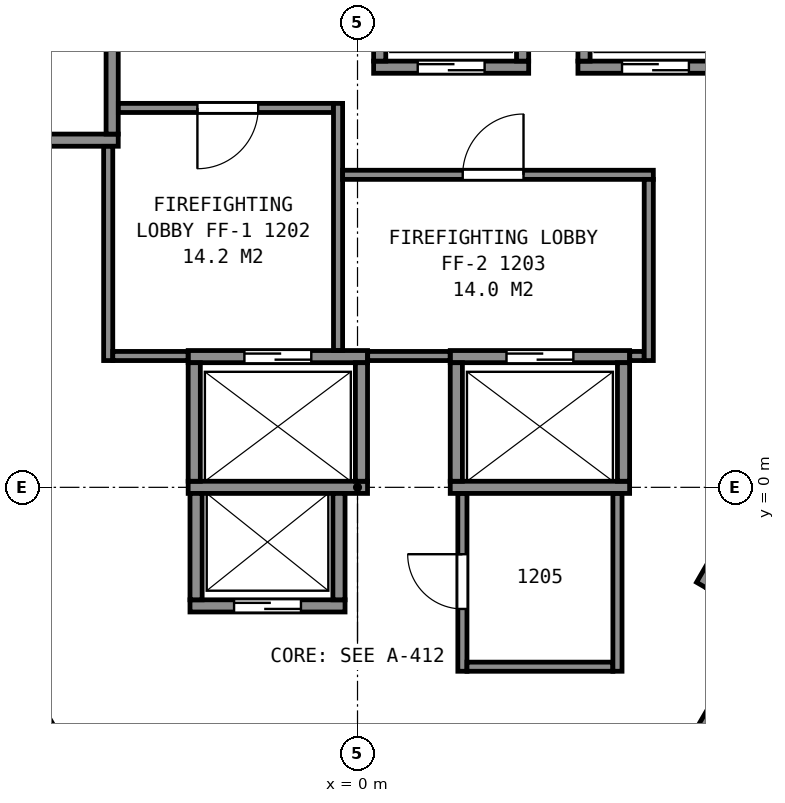
"""IFC4 building model, lengths in metres.
Left out: names, types, materials, properties, quantities, classifications, styles, units other than length and angle.
Written with IfcOpenShell. Run it as: python <this file> out.ifc"""

import sys

from ifc_helpers import new_model, si_unit, direction, frame, frame_2d, origin, place, context, subcontext, project, spatial, rectangle, extrude, element, fill, save


model = new_model("IFC4")
c1 = context("Model", 3, precision=1e-05, world=origin(), true_north=direction((0.0, 1.0)))
c2 = subcontext(c1, "Body", "Model", "MODEL_VIEW")
j1 = project(units=[si_unit("LENGTHUNIT", "METRE"), si_unit("PLANEANGLEUNIT", "RADIAN")], contexts=[c1])
p1 = place(None, origin())
s1 = spatial("IfcSite", under=j1, at=p1, CompositionType="ELEMENT")
p2 = place(p1, origin())
s2 = spatial("IfcBuilding", under=s1, at=p2, CompositionType="ELEMENT")
p3 = place(p2, frame((0.0, 0.0, 58.4)))
s3 = spatial("IfcBuildingStorey", under=s2, at=p3, CompositionType="ELEMENT", Elevation=58.4)
p4 = place(p3, frame((-2.755, -1.95, 0.0), z_axis=(0.0, 0.0, 1.0), x_axis=(1.0, 0.0, 0.0)))
e1 = element("IfcWall", 1, at=p4, inside=s3, PredefinedType="PARTITIONING", context=c2, shape_type="SweptSolid", body=[
    extrude(rectangle(XDim=2.55, YDim=0.2, at=frame_2d((1.275, 0.0))), origin(), (0.0, 0.0, 1.0), 3.6),
])
p5 = place(p4, frame((0.725, 0.0, 0.0)))
e2 = element("IfcOpeningElement", 2, at=p5, cuts=e1, PredefinedType="OPENING", context=c2, shape_type="SweptSolid", body=[
    extrude(rectangle(XDim=1.1, YDim=2.1, at=frame_2d((0.55, 1.05))), frame((0.0, 0.11, 0.0), z_axis=(0.0, -1.0, 0.0), x_axis=(1.0, 0.0, 0.0)), (0.0, 0.0, 1.0), 0.22),
])
p6 = place(p3, frame((-2.785, 0.0, 0.0), z_axis=(0.0, 0.0, 1.0), x_axis=(1.0, 0.0, 0.0)))
e3 = element("IfcWall", 3, at=p6, inside=s3, PredefinedType="PARTITIONING", context=c2, shape_type="SweptSolid", body=[
    extrude(rectangle(XDim=2.95, YDim=0.2, at=frame_2d((1.475, 0.0))), origin(), (0.0, 0.0, 1.0), 3.6),
])
p7 = place(p3, frame((1.525, 0.0, 0.0), z_axis=(0.0, 0.0, 1.0), x_axis=(1.0, 0.0, 0.0)))
e4 = element("IfcWall", 4, at=p7, inside=s3, PredefinedType="PARTITIONING", context=c2, shape_type="SweptSolid", body=[
    extrude(rectangle(XDim=2.95, YDim=0.2, at=frame_2d((1.475, 0.0))), origin(), (0.0, 0.0, 1.0), 3.6),
])
p8 = place(p3, frame((-2.785, 2.15, 0.0), z_axis=(0.0, 0.0, 1.0), x_axis=(1.0, 0.0, 0.0)))
e5 = element("IfcWall", 5, at=p8, inside=s3, PredefinedType="PARTITIONING", context=c2, shape_type="SweptSolid", body=[
    extrude(rectangle(XDim=2.95, YDim=0.2, at=frame_2d((1.475, 0.0))), origin(), (0.0, 0.0, 1.0), 3.6),
])
p9 = place(p8, frame((0.925, 0.0, 0.0)))
e6 = element("IfcOpeningElement", 6, at=p9, cuts=e5, PredefinedType="OPENING", context=c2, shape_type="SweptSolid", body=[
    extrude(rectangle(XDim=1.1, YDim=2.1, at=frame_2d((0.55, 1.05))), frame((0.0, 0.11, 0.0), z_axis=(0.0, -1.0, 0.0), x_axis=(1.0, 0.0, 0.0)), (0.0, 0.0, 1.0), 0.22),
])
p10 = place(p3, frame((1.525, 2.15, 0.0), z_axis=(0.0, 0.0, 1.0), x_axis=(1.0, 0.0, 0.0)))
e7 = element("IfcWall", 7, at=p10, inside=s3, PredefinedType="PARTITIONING", context=c2, shape_type="SweptSolid", body=[
    extrude(rectangle(XDim=2.95, YDim=0.2, at=frame_2d((1.475, 0.0))), origin(), (0.0, 0.0, 1.0), 3.6),
])
p11 = place(p10, frame((0.925, 0.0, 0.0)))
e8 = element("IfcOpeningElement", 8, at=p11, cuts=e7, PredefinedType="OPENING", context=c2, shape_type="SweptSolid", body=[
    extrude(rectangle(XDim=1.1, YDim=2.1, at=frame_2d((0.55, 1.05))), frame((0.0, 0.11, 0.0), z_axis=(0.0, -1.0, 0.0), x_axis=(1.0, 0.0, 0.0)), (0.0, 0.0, 1.0), 0.22),
])
p12 = place(p3, frame((-6.285, 5.71, 0.0), z_axis=(0.0, 0.0, 1.0), x_axis=(1.0, 0.0, 0.0)))
e9 = element("IfcWall", 9, at=p12, inside=s3, PredefinedType="PARTITIONING", context=c2, shape_type="SweptSolid", body=[
    extrude(rectangle(XDim=2.35, YDim=0.2, at=frame_2d((1.175, 0.0))), origin(), (0.0, 0.0, 1.0), 3.6),
])
p13 = place(p3, frame((0.265, 6.91, 0.0), z_axis=(0.0, 0.0, 1.0), x_axis=(1.0, 0.0, 0.0)))
e10 = element("IfcWall", 10, at=p13, inside=s3, PredefinedType="PARTITIONING", context=c2, shape_type="SweptSolid", body=[
    extrude(rectangle(XDim=2.55, YDim=0.2, at=frame_2d((1.275, 0.0))), origin(), (0.0, 0.0, 1.0), 3.6),
])
p14 = place(p13, frame((0.725, 0.0, 0.0)))
e11 = element("IfcOpeningElement", 11, at=p14, cuts=e10, PredefinedType="OPENING", context=c2, shape_type="SweptSolid", body=[
    extrude(rectangle(XDim=1.1, YDim=2.1, at=frame_2d((0.55, 1.05))), frame((0.0, 0.11, 0.0), z_axis=(0.0, -1.0, 0.0), x_axis=(1.0, 0.0, 0.0)), (0.0, 0.0, 1.0), 0.22),
])
p15 = place(p3, frame((3.625, 6.91, 0.0), z_axis=(0.0, 0.0, 1.0), x_axis=(1.0, 0.0, 0.0)))
e12 = element("IfcWall", 12, at=p15, inside=s3, PredefinedType="PARTITIONING", context=c2, shape_type="SweptSolid", body=[
    extrude(rectangle(XDim=2.55, YDim=0.2, at=frame_2d((1.275, 0.0))), origin(), (0.0, 0.0, 1.0), 3.6),
])
p16 = place(p15, frame((0.725, 0.0, 0.0)))
e13 = element("IfcOpeningElement", 13, at=p16, cuts=e12, PredefinedType="OPENING", context=c2, shape_type="SweptSolid", body=[
    extrude(rectangle(XDim=1.1, YDim=2.1, at=frame_2d((0.55, 1.05))), frame((0.0, 0.11, 0.0), z_axis=(0.0, -1.0, 0.0), x_axis=(1.0, 0.0, 0.0)), (0.0, 0.0, 1.0), 0.22),
])
p17 = place(p3, frame((5.527, -4.247, 0.0), z_axis=(0.0, 0.0, 1.0), x_axis=(0.499938297808, 0.866061024631, 0.0)))
e14 = element("IfcWall", 14, at=p17, inside=s3, PredefinedType="PARTITIONING", context=c2, shape_type="SweptSolid", body=[
    extrude(rectangle(XDim=2.35, YDim=0.2, at=frame_2d((1.175, 0.0))), origin(), (0.0, 0.0, 1.0), 3.6),
])
p18 = place(p17, frame((0.725, 0.0, 0.0)))
e15 = element("IfcOpeningElement", 15, at=p18, cuts=e14, PredefinedType="OPENING", context=c2, shape_type="SweptSolid", body=[
    extrude(rectangle(XDim=1.1, YDim=2.1, at=frame_2d((0.55, 1.05))), frame((0.0, 0.11, 0.0), z_axis=(0.0, -1.0, 0.0), x_axis=(1.0, 0.0, 0.0)), (0.0, 0.0, 1.0), 0.22),
])
p19 = place(p3, frame((5.663, -1.612, 0.0), z_axis=(0.0, 0.0, 1.0), x_axis=(0.49998122708, 0.866036242063, 0.0)))
e16 = element("IfcWall", 16, at=p19, inside=s3, PredefinedType="PARTITIONING", context=c2, shape_type="SweptSolid", body=[
    extrude(rectangle(XDim=4.9, YDim=0.2, at=frame_2d((2.45, 0.0))), origin(), (0.0, 0.0, 1.0), 3.6),
])
p20 = place(p3, frame((4.375, 0.1, 0.0), z_axis=(0.0, 0.0, 1.0), x_axis=(0.0, 1.0, 0.0)))
e17 = element("IfcWall", 17, at=p20, inside=s3, PredefinedType="PARTITIONING", context=c2, shape_type="SweptSolid", body=[
    extrude(rectangle(XDim=1.95, YDim=0.2, at=frame_2d((0.975, 0.0))), origin(), (0.0, 0.0, 1.0), 3.6),
])
for number, where, z_axis, x_axis in (
    (18, (3.725, 7.01, 0.0), (0.0, 0.0, 1.0), (0.0, 1.0, 0.0)),
    (19, (2.715, 7.01, 0.0), (0.0, 0.0, 1.0), (0.0, 1.0, 0.0)),
):
    element("IfcWall", number, at=place(p3, frame(where, z_axis=z_axis, x_axis=x_axis)), inside=s3, PredefinedType="PARTITIONING", context=c2, shape_type="SweptSolid", body=[
        extrude(rectangle(XDim=1.75, YDim=0.2, at=frame_2d((0.875, 0.0))), origin(), (0.0, 0.0, 1.0), 3.6),
    ])
p21 = place(p3, frame((1.625, 0.1, 0.0), z_axis=(0.0, 0.0, 1.0), x_axis=(0.0, 1.0, 0.0)))
e20 = element("IfcWall", 20, at=p21, inside=s3, PredefinedType="PARTITIONING", context=c2, shape_type="SweptSolid", body=[
    extrude(rectangle(XDim=1.95, YDim=0.2, at=frame_2d((0.975, 0.0))), origin(), (0.0, 0.0, 1.0), 3.6),
])
p22 = place(p3, frame((0.365, 7.01, 0.0), z_axis=(0.0, 0.0, 1.0), x_axis=(0.0, 1.0, 0.0)))
e21 = element("IfcWall", 21, at=p22, inside=s3, PredefinedType="PARTITIONING", context=c2, shape_type="SweptSolid", body=[
    extrude(rectangle(XDim=1.75, YDim=0.2, at=frame_2d((0.875, 0.0))), origin(), (0.0, 0.0, 1.0), 3.6),
])
p23 = place(p3, frame((0.065, 0.1, 0.0), z_axis=(0.0, 0.0, 1.0), x_axis=(0.0, 1.0, 0.0)))
e22 = element("IfcWall", 22, at=p23, inside=s3, PredefinedType="PARTITIONING", context=c2, shape_type="SweptSolid", body=[
    extrude(rectangle(XDim=1.95, YDim=0.2, at=frame_2d((0.975, 0.0))), origin(), (0.0, 0.0, 1.0), 3.6),
])
for number, where, z_axis, x_axis in (
    (23, (-0.305, -1.85, 0.0), (0.0, 0.0, 1.0), (0.0, 1.0, 0.0)),
    (24, (-2.655, -1.85, 0.0), (0.0, 0.0, 1.0), (0.0, 1.0, 0.0)),
):
    element("IfcWall", number, at=place(p3, frame(where, z_axis=z_axis, x_axis=x_axis)), inside=s3, PredefinedType="PARTITIONING", context=c2, shape_type="SweptSolid", body=[
        extrude(rectangle(XDim=1.75, YDim=0.2, at=frame_2d((0.875, 0.0))), origin(), (0.0, 0.0, 1.0), 3.6),
    ])
p24 = place(p3, frame((-2.685, 0.1, 0.0), z_axis=(0.0, 0.0, 1.0), x_axis=(0.0, 1.0, 0.0)))
e25 = element("IfcWall", 25, at=p24, inside=s3, PredefinedType="PARTITIONING", context=c2, shape_type="SweptSolid", body=[
    extrude(rectangle(XDim=1.95, YDim=0.2, at=frame_2d((0.975, 0.0))), origin(), (0.0, 0.0, 1.0), 3.6),
])
p25 = place(p3, frame((-4.035, 5.81, 0.0), z_axis=(0.0, 0.0, 1.0), x_axis=(0.0, 1.0, 0.0)))
e26 = element("IfcWall", 26, at=p25, inside=s3, PredefinedType="PARTITIONING", context=c2, shape_type="SweptSolid", body=[
    extrude(rectangle(XDim=1.75, YDim=0.2, at=frame_2d((0.875, 0.0))), origin(), (0.0, 0.0, 1.0), 3.6),
])
p26 = place(p3, frame((-13.664, 5.946, 0.0), z_axis=(0.0, 0.0, 1.0), x_axis=(0.499994327219, -0.866028678941, 0.0)))
e27 = element("IfcWall", 27, at=p26, inside=s3, PredefinedType="PARTITIONING", context=c2, shape_type="SweptSolid", body=[
    extrude(rectangle(XDim=23.968, YDim=0.2, at=frame_2d((11.984, 0.0))), origin(), (0.0, 0.0, 1.0), 3.35),
])
p27 = place(p3, frame((-4.091, -5.635, 0.0), z_axis=(0.0, 0.0, 1.0), x_axis=(-0.499948934428, 0.866054884499, 0.0)))
e28 = element("IfcWall", 28, at=p27, inside=s3, PredefinedType="PARTITIONING", context=c2, shape_type="SweptSolid", body=[
    extrude(rectangle(XDim=3.577, YDim=0.15, at=frame_2d((1.789, 0.0))), origin(), (0.0, 0.0, 1.0), 3.35),
])
p28 = place(p27, frame((2.377, 0.0, 0.0)))
e29 = element("IfcOpeningElement", 29, at=p28, cuts=e28, PredefinedType="OPENING", context=c2, shape_type="SweptSolid", body=[
    extrude(rectangle(XDim=0.9, YDim=2.1, at=frame_2d((0.45, 1.05))), frame((0.0, 0.085, 0.0), z_axis=(0.0, -1.0, 0.0), x_axis=(1.0, 0.0, 0.0)), (0.0, 0.0, 1.0), 0.17),
])
p29 = place(p27, frame((0.605, 0.0, 0.0)))
e30 = element("IfcOpeningElement", 30, at=p29, cuts=e28, PredefinedType="OPENING", context=c2, shape_type="SweptSolid", body=[
    extrude(rectangle(XDim=0.9, YDim=2.1, at=frame_2d((0.45, 1.05))), frame((0.0, 0.085, 0.0), z_axis=(0.0, -1.0, 0.0), x_axis=(1.0, 0.0, 0.0)), (0.0, 0.0, 1.0), 0.17),
])
p30 = place(p3, frame((-4.1, 2.085, 0.0), z_axis=(0.0, 0.0, 1.0), x_axis=(0.0, 1.0, 0.0)))
e31 = element("IfcWall", 31, at=p30, inside=s3, PredefinedType="PARTITIONING", context=c2, shape_type="SweptSolid", body=[
    extrude(rectangle(XDim=3.523, YDim=0.15, at=frame_2d((1.761, 0.0))), origin(), (0.0, 0.0, 1.0), 3.35),
])
p31 = place(p3, frame((-4.025, 2.16, 0.0), z_axis=(0.0, 0.0, 1.0), x_axis=(1.0, 0.0, 0.0)))
e32 = element("IfcWall", 32, at=p31, inside=s3, PredefinedType="PARTITIONING", context=c2, shape_type="SweptSolid", body=[
    extrude(rectangle(XDim=1.238, YDim=0.15, at=frame_2d((0.619, 0.0))), origin(), (0.0, 0.0, 1.0), 3.35),
])
p32 = place(p3, frame((-3.933, 6.24, 0.0), z_axis=(0.0, 0.0, 1.0), x_axis=(1.0, 0.0, 0.0)))
e33 = element("IfcWall", 33, at=p32, inside=s3, PredefinedType="PARTITIONING", context=c2, shape_type="SweptSolid", body=[
    extrude(rectangle(XDim=3.538, YDim=0.15, at=frame_2d((1.769, 0.0))), origin(), (0.0, 0.0, 1.0), 3.35),
])
p33 = place(p32, frame((1.3, 0.0, 0.0)))
e34 = element("IfcOpeningElement", 34, at=p33, cuts=e33, PredefinedType="OPENING", context=c2, shape_type="SweptSolid", body=[
    extrude(rectangle(XDim=1.0, YDim=2.1, at=frame_2d((0.5, 1.05))), frame((0.0, 0.085, 0.0), z_axis=(0.0, -1.0, 0.0), x_axis=(1.0, 0.0, 0.0)), (0.0, 0.0, 1.0), 0.17),
])
p34 = place(p3, frame((-0.32, 2.252, 0.0), z_axis=(0.0, 0.0, 1.0), x_axis=(0.0, 1.0, 0.0)))
e35 = element("IfcWall", 35, at=p34, inside=s3, PredefinedType="PARTITIONING", context=c2, shape_type="SweptSolid", body=[
    extrude(rectangle(XDim=4.063, YDim=0.15, at=frame_2d((2.031, 0.0))), origin(), (0.0, 0.0, 1.0), 3.35),
])
p35 = place(p3, frame((-0.245, 5.14, 0.0), z_axis=(0.0, 0.0, 1.0), x_axis=(1.0, 0.0, 0.0)))
e36 = element("IfcWall", 36, at=p35, inside=s3, PredefinedType="PARTITIONING", context=c2, shape_type="SweptSolid", body=[
    extrude(rectangle(XDim=5.11, YDim=0.15, at=frame_2d((2.555, 0.0))), origin(), (0.0, 0.0, 1.0), 3.35),
])
p36 = place(p35, frame((1.975, 0.0, 0.0)))
e37 = element("IfcOpeningElement", 37, at=p36, cuts=e36, PredefinedType="OPENING", context=c2, shape_type="SweptSolid", body=[
    extrude(rectangle(XDim=1.0, YDim=2.1, at=frame_2d((0.5, 1.05))), frame((0.0, 0.085, 0.0), z_axis=(0.0, -1.0, 0.0), x_axis=(1.0, 0.0, 0.0)), (0.0, 0.0, 1.0), 0.17),
])
p37 = place(p3, frame((0.167, 2.16, 0.0), z_axis=(0.0, 0.0, 1.0), x_axis=(1.0, 0.0, 0.0)))
e38 = element("IfcWall", 38, at=p37, inside=s3, PredefinedType="PARTITIONING", context=c2, shape_type="SweptSolid", body=[
    extrude(rectangle(XDim=1.356, YDim=0.15, at=frame_2d((0.678, 0.0))), origin(), (0.0, 0.0, 1.0), 3.35),
])
p38 = place(p3, frame((1.725, -0.102, 0.0), z_axis=(0.0, 0.0, 1.0), x_axis=(0.0, -1.0, 0.0)))
e39 = element("IfcWall", 39, at=p38, inside=s3, PredefinedType="PARTITIONING", context=c2, shape_type="SweptSolid", body=[
    extrude(rectangle(XDim=2.923, YDim=0.15, at=frame_2d((1.461, 0.0))), origin(), (0.0, 0.0, 1.0), 3.35),
])
p39 = place(p38, frame((0.998, 0.0, 0.0)))
e40 = element("IfcOpeningElement", 40, at=p39, cuts=e39, PredefinedType="OPENING", context=c2, shape_type="SweptSolid", body=[
    extrude(rectangle(XDim=0.9, YDim=2.1, at=frame_2d((0.45, 1.05))), frame((0.0, 0.085, 0.0), z_axis=(0.0, -1.0, 0.0), x_axis=(1.0, 0.0, 0.0)), (0.0, 0.0, 1.0), 0.17),
])
p40 = place(p3, frame((1.8, -2.95, 0.0), z_axis=(0.0, 0.0, 1.0), x_axis=(1.0, 0.0, 0.0)))
e41 = element("IfcWall", 41, at=p40, inside=s3, PredefinedType="PARTITIONING", context=c2, shape_type="SweptSolid", body=[
    extrude(rectangle(XDim=2.4, YDim=0.15, at=frame_2d((1.2, 0.0))), origin(), (0.0, 0.0, 1.0), 3.35),
])
p41 = place(p3, frame((4.275, -3.025, 0.0), z_axis=(0.0, 0.0, 1.0), x_axis=(0.0, 1.0, 0.0)))
e42 = element("IfcWall", 42, at=p41, inside=s3, PredefinedType="PARTITIONING", context=c2, shape_type="SweptSolid", body=[
    extrude(rectangle(XDim=2.923, YDim=0.15, at=frame_2d((1.461, 0.0))), origin(), (0.0, 0.0, 1.0), 3.35),
])
p42 = place(p3, frame((4.477, 2.16, 0.0), z_axis=(0.0, 0.0, 1.0), x_axis=(1.0, 0.0, 0.0)))
e43 = element("IfcWall", 43, at=p42, inside=s3, PredefinedType="PARTITIONING", context=c2, shape_type="SweptSolid", body=[
    extrude(rectangle(XDim=0.238, YDim=0.15, at=frame_2d((0.119, 0.0))), origin(), (0.0, 0.0, 1.0), 3.35),
])
p43 = place(p3, frame((4.79, 2.085, 0.0), z_axis=(0.0, 0.0, 1.0), x_axis=(0.0, 1.0, 0.0)))
e44 = element("IfcWall", 44, at=p43, inside=s3, PredefinedType="PARTITIONING", context=c2, shape_type="SweptSolid", body=[
    extrude(rectangle(XDim=2.98, YDim=0.15, at=frame_2d((1.49, 0.0))), origin(), (0.0, 0.0, 1.0), 3.35),
])
p44 = place(p3, frame((-3.766, -17.558, 0.0), z_axis=(0.0, 0.0, 1.0), x_axis=(-0.500008349927, 0.866020582898, 0.0)))
e45 = element("IfcWall", 45, at=p44, inside=s3, PredefinedType="PARTITIONING", context=c2, shape_type="SweptSolid", body=[
    extrude(rectangle(XDim=22.496, YDim=0.125, at=frame_2d((11.248, 0.0))), origin(), (0.0, 0.0, 1.0), 2.613),
])
p45 = place(p44, frame((20.563, 0.0, 0.0)))
e46 = element("IfcOpeningElement", 46, at=p45, cuts=e45, PredefinedType="OPENING", context=c2, shape_type="SweptSolid", body=[
    extrude(rectangle(XDim=0.9, YDim=2.1, at=frame_2d((0.45, 1.05))), frame((0.0, 0.073, 0.0), z_axis=(0.0, -1.0, 0.0), x_axis=(1.0, 0.0, 0.0)), (0.0, 0.0, 1.0), 0.145),
])
p46 = place(p44, frame((13.476, 0.0, 0.0)))
e47 = element("IfcOpeningElement", 47, at=p46, cuts=e45, PredefinedType="OPENING", context=c2, shape_type="SweptSolid", body=[
    extrude(rectangle(XDim=0.9, YDim=2.1, at=frame_2d((0.45, 1.05))), frame((0.0, 0.073, 0.0), z_axis=(0.0, -1.0, 0.0), x_axis=(1.0, 0.0, 0.0)), (0.0, 0.0, 1.0), 0.145),
])
p47 = place(p44, frame((10.684, 0.0, 0.0)))
e48 = element("IfcOpeningElement", 48, at=p47, cuts=e45, PredefinedType="OPENING", context=c2, shape_type="SweptSolid", body=[
    extrude(rectangle(XDim=0.9, YDim=2.1, at=frame_2d((0.45, 1.05))), frame((0.0, 0.073, 0.0), z_axis=(0.0, -1.0, 0.0), x_axis=(1.0, 0.0, 0.0)), (0.0, 0.0, 1.0), 0.145),
])
p48 = place(p44, frame((3.948, 0.0, 0.0)))
e49 = element("IfcOpeningElement", 49, at=p48, cuts=e45, PredefinedType="OPENING", context=c2, shape_type="SweptSolid", body=[
    extrude(rectangle(XDim=0.9, YDim=2.1, at=frame_2d((0.45, 1.05))), frame((0.0, 0.073, 0.0), z_axis=(0.0, -1.0, 0.0), x_axis=(1.0, 0.0, 0.0)), (0.0, 0.0, 1.0), 0.145),
])
p49 = place(p44, frame((1.411, 0.0, 0.0)))
e50 = element("IfcOpeningElement", 50, at=p49, cuts=e45, PredefinedType="OPENING", context=c2, shape_type="SweptSolid", body=[
    extrude(rectangle(XDim=0.9, YDim=2.1, at=frame_2d((0.45, 1.05))), frame((0.0, 0.073, 0.0), z_axis=(0.0, -1.0, 0.0), x_axis=(1.0, 0.0, 0.0)), (0.0, 0.0, 1.0), 0.145),
])
p50 = place(p3, frame((17.486, 6.206, 0.0), z_axis=(0.0, 0.0, 1.0), x_axis=(-0.499990458811, -0.866030912322, 0.0)))
e51 = element("IfcWall", 51, at=p50, inside=s3, PredefinedType="PARTITIONING", context=c2, shape_type="SweptSolid", body=[
    extrude(rectangle(XDim=27.441, YDim=0.125, at=frame_2d((13.721, 0.0))), origin(), (0.0, 0.0, 1.0), 2.613),
])
p51 = place(p50, frame((20.529, 0.0, 0.0)))
e52 = element("IfcOpeningElement", 52, at=p51, cuts=e51, PredefinedType="OPENING", context=c2, shape_type="SweptSolid", body=[
    extrude(rectangle(XDim=0.9, YDim=2.1, at=frame_2d((0.45, 1.05))), frame((0.0, 0.073, 0.0), z_axis=(0.0, -1.0, 0.0), x_axis=(1.0, 0.0, 0.0)), (0.0, 0.0, 1.0), 0.145),
])
p52 = place(p50, frame((17.516, 0.0, 0.0)))
e53 = element("IfcOpeningElement", 53, at=p52, cuts=e51, PredefinedType="OPENING", context=c2, shape_type="SweptSolid", body=[
    extrude(rectangle(XDim=0.9, YDim=2.1, at=frame_2d((0.45, 1.05))), frame((0.0, 0.073, 0.0), z_axis=(0.0, -1.0, 0.0), x_axis=(1.0, 0.0, 0.0)), (0.0, 0.0, 1.0), 0.145),
])
p53 = place(p50, frame((10.168, 0.0, 0.0)))
e54 = element("IfcOpeningElement", 54, at=p53, cuts=e51, PredefinedType="OPENING", context=c2, shape_type="SweptSolid", body=[
    extrude(rectangle(XDim=0.9, YDim=2.1, at=frame_2d((0.45, 1.05))), frame((0.0, 0.073, 0.0), z_axis=(0.0, -1.0, 0.0), x_axis=(1.0, 0.0, 0.0)), (0.0, 0.0, 1.0), 0.145),
])
p54 = place(p50, frame((7.403, 0.0, 0.0)))
e55 = element("IfcOpeningElement", 55, at=p54, cuts=e51, PredefinedType="OPENING", context=c2, shape_type="SweptSolid", body=[
    extrude(rectangle(XDim=0.9, YDim=2.1, at=frame_2d((0.45, 1.05))), frame((0.0, 0.073, 0.0), z_axis=(0.0, -1.0, 0.0), x_axis=(1.0, 0.0, 0.0)), (0.0, 0.0, 1.0), 0.145),
])
p55 = place(p50, frame((0.741, 0.0, 0.0)))
e56 = element("IfcOpeningElement", 56, at=p55, cuts=e51, PredefinedType="OPENING", context=c2, shape_type="SweptSolid", body=[
    extrude(rectangle(XDim=0.9, YDim=2.1, at=frame_2d((0.45, 1.05))), frame((0.0, 0.073, 0.0), z_axis=(0.0, -1.0, 0.0), x_axis=(1.0, 0.0, 0.0)), (0.0, 0.0, 1.0), 0.145),
])
p56 = place(p14, origin())
e57 = element("IfcDoor", 57, at=p56, inside=s3, OperationType="SLIDING_TO_LEFT", PredefinedType="DOOR", context=c2, shape_type="SweptSolid", body=[
    extrude(rectangle(XDim=1.1, YDim=2.1, at=frame_2d((0.55, 1.05))), frame((0.0, 0.025, 0.0), z_axis=(0.0, -1.0, 0.0), x_axis=(1.0, 0.0, 0.0)), (0.0, 0.0, 1.0), 0.05),
])
fill(e11, e57)
p57 = place(p5, origin())
e58 = element("IfcDoor", 58, at=p57, inside=s3, OperationType="SLIDING_TO_RIGHT", PredefinedType="DOOR", context=c2, shape_type="SweptSolid", body=[
    extrude(rectangle(XDim=1.1, YDim=2.1, at=frame_2d((0.55, 1.05))), frame((0.0, 0.025, 0.0), z_axis=(0.0, -1.0, 0.0), x_axis=(1.0, 0.0, 0.0)), (0.0, 0.0, 1.0), 0.05),
])
fill(e2, e58)
p58 = place(p16, origin())
e59 = element("IfcDoor", 59, at=p58, inside=s3, OperationType="SLIDING_TO_LEFT", PredefinedType="DOOR", context=c2, shape_type="SweptSolid", body=[
    extrude(rectangle(XDim=1.1, YDim=2.1, at=frame_2d((0.55, 1.05))), frame((0.0, 0.025, 0.0), z_axis=(0.0, -1.0, 0.0), x_axis=(1.0, 0.0, 0.0)), (0.0, 0.0, 1.0), 0.05),
])
fill(e13, e59)
p59 = place(p9, origin())
e60 = element("IfcDoor", 60, at=p59, inside=s3, OperationType="SLIDING_TO_LEFT", PredefinedType="DOOR", context=c2, shape_type="SweptSolid", body=[
    extrude(rectangle(XDim=1.1, YDim=2.1, at=frame_2d((0.55, 1.05))), frame((0.0, 0.025, 0.0), z_axis=(0.0, -1.0, 0.0), x_axis=(1.0, 0.0, 0.0)), (0.0, 0.0, 1.0), 0.05),
])
fill(e6, e60)
p60 = place(p11, origin())
e61 = element("IfcDoor", 61, at=p60, inside=s3, OperationType="SLIDING_TO_RIGHT", PredefinedType="DOOR", context=c2, shape_type="SweptSolid", body=[
    extrude(rectangle(XDim=1.1, YDim=2.1, at=frame_2d((0.55, 1.05))), frame((0.0, 0.025, 0.0), z_axis=(0.0, -1.0, 0.0), x_axis=(1.0, 0.0, 0.0)), (0.0, 0.0, 1.0), 0.05),
])
fill(e8, e61)
p61 = place(p33, origin())
e62 = element("IfcDoor", 62, at=p61, inside=s3, OperationType="SINGLE_SWING_LEFT", PredefinedType="DOOR", context=c2, shape_type="SweptSolid", body=[
    extrude(rectangle(XDim=1.0, YDim=2.1, at=frame_2d((0.5, 1.05))), frame((0.0, 0.025, 0.0), z_axis=(0.0, -1.0, 0.0), x_axis=(1.0, 0.0, 0.0)), (0.0, 0.0, 1.0), 0.05),
])
fill(e34, e62)
p62 = place(p36, origin())
e63 = element("IfcDoor", 63, at=p62, inside=s3, OperationType="SINGLE_SWING_RIGHT", PredefinedType="DOOR", context=c2, shape_type="SweptSolid", body=[
    extrude(rectangle(XDim=1.0, YDim=2.1, at=frame_2d((0.5, 1.05))), frame((0.0, 0.025, 0.0), z_axis=(0.0, -1.0, 0.0), x_axis=(1.0, 0.0, 0.0)), (0.0, 0.0, 1.0), 0.05),
])
fill(e37, e63)
p63 = place(p39, origin())
e64 = element("IfcDoor", 64, at=p63, inside=s3, OperationType="SINGLE_SWING_LEFT", PredefinedType="DOOR", context=c2, shape_type="SweptSolid", body=[
    extrude(rectangle(XDim=0.9, YDim=2.1, at=frame_2d((0.45, 1.05))), frame((0.0, 0.025, 0.0), z_axis=(0.0, -1.0, 0.0), x_axis=(1.0, 0.0, 0.0)), (0.0, 0.0, 1.0), 0.05),
])
fill(e40, e64)
save(model, sys.argv[1])
